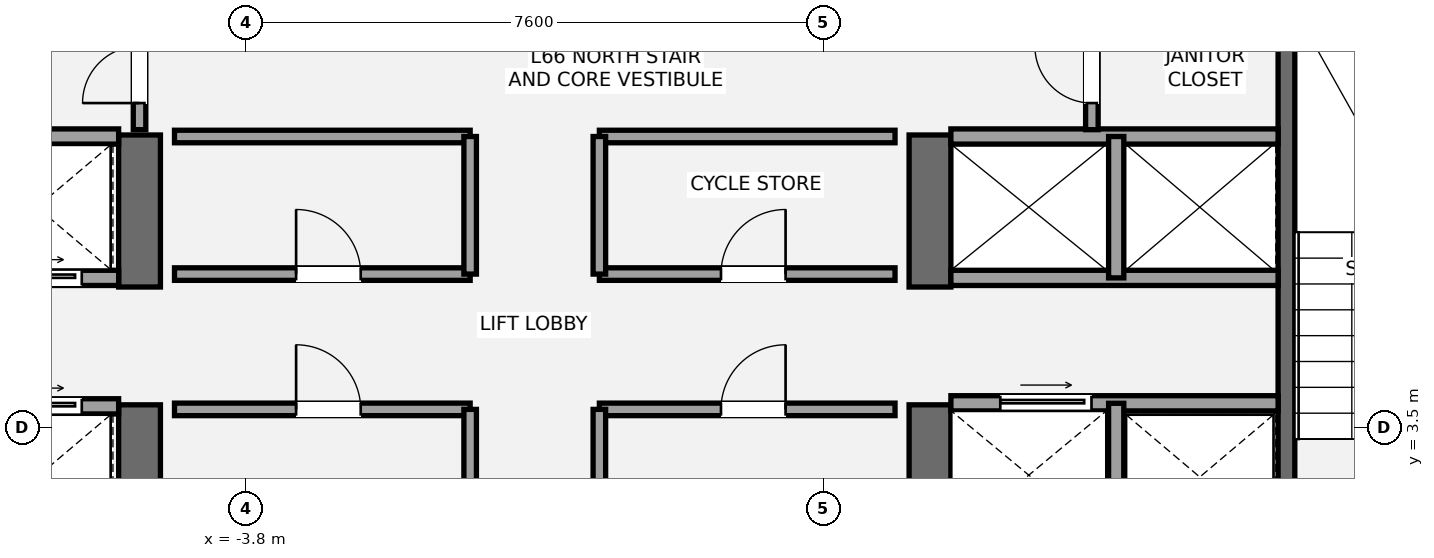
"""IFC4 building model, lengths in metres.
Left out: names, types, materials, properties, quantities, classifications, styles, units other than length and angle.
Written with IfcOpenShell. Run it as: python <this file> out.ifc"""

import sys

from ifc_helpers import new_model, si_unit, direction, frame, frame_2d, origin, place, context, subcontext, project, spatial, rectangle, extrude, element, fill, save


model = new_model("IFC4")
c1 = context("Model", 3, precision=1e-05, world=origin(), true_north=direction((0.0, 1.0)))
c2 = subcontext(c1, "Body", "Model", "MODEL_VIEW")
j1 = project(units=[si_unit("LENGTHUNIT", "METRE"), si_unit("PLANEANGLEUNIT", "RADIAN")], contexts=[c1])
p1 = place(None, origin())
s1 = spatial("IfcSite", under=j1, at=p1, CompositionType="ELEMENT")
p2 = place(p1, origin())
s2 = spatial("IfcBuilding", under=s1, at=p2, CompositionType="ELEMENT")
p3 = place(p2, frame((0.0, 0.0, 235.2)))
s3 = spatial("IfcBuildingStorey", under=s2, at=p3, CompositionType="ELEMENT", Elevation=235.2)
p4 = place(p3, frame((-5.2, 1.3, 0.0), z_axis=(0.0, 0.0, 1.0), x_axis=(0.0, 1.0, 0.0)))
e1 = element("IfcWall", 1, at=p4, inside=s3, PredefinedType="SHEAR", context=c2, shape_type="SweptSolid", body=[
    extrude(rectangle(XDim=2.5, YDim=0.55, at=frame_2d((1.25, 0.0))), origin(), (0.0, 0.0, 1.0), 3.15),
])
p5 = place(p3, frame((-5.2, 5.35, 0.0), z_axis=(0.0, 0.0, 1.0), x_axis=(0.0, 1.0, 0.0)))
e2 = element("IfcWall", 2, at=p5, inside=s3, PredefinedType="SHEAR", context=c2, shape_type="SweptSolid", body=[
    extrude(rectangle(XDim=2.0, YDim=0.55, at=frame_2d((1.0, 0.0))), origin(), (0.0, 0.0, 1.0), 3.15),
])
p6 = place(p3, frame((5.2, 1.3, 0.0), z_axis=(0.0, 0.0, 1.0), x_axis=(0.0, 1.0, 0.0)))
e3 = element("IfcWall", 3, at=p6, inside=s3, PredefinedType="SHEAR", context=c2, shape_type="SweptSolid", body=[
    extrude(rectangle(XDim=2.5, YDim=0.55, at=frame_2d((1.25, 0.0))), origin(), (0.0, 0.0, 1.0), 3.15),
])
p7 = place(p3, frame((5.2, 5.35, 0.0), z_axis=(0.0, 0.0, 1.0), x_axis=(0.0, 1.0, 0.0)))
e4 = element("IfcWall", 4, at=p7, inside=s3, PredefinedType="SHEAR", context=c2, shape_type="SweptSolid", body=[
    extrude(rectangle(XDim=2.0, YDim=0.55, at=frame_2d((1.0, 0.0))), origin(), (0.0, 0.0, 1.0), 3.15),
])
p8 = place(p3, frame((9.89, 1.85, 0.0), z_axis=(0.0, 0.0, 1.0), x_axis=(0.0, 1.0, 0.0)))
e5 = element("IfcWall", 5, at=p8, inside=s3, PredefinedType="SHEAR", context=c2, shape_type="SweptSolid", body=[
    extrude(rectangle(XDim=7.15, YDim=0.22, at=frame_2d((3.575, 0.0))), origin(), (0.0, 0.0, 1.0), 3.15),
])
p9 = place(p3, frame((-9.78, 3.78, 0.0), z_axis=(0.0, 0.0, 1.0), x_axis=(1.0, 0.0, 0.0)))
e6 = element("IfcWall", 6, at=p9, inside=s3, PredefinedType="SOLIDWALL", context=c2, shape_type="SweptSolid", body=[
    extrude(rectangle(XDim=4.305, YDim=0.2, at=frame_2d((2.152, 0.0))), origin(), (0.0, 0.0, 1.0), 2.97),
])
p10 = place(p9, frame((2.72, 0.0, 0.0)))
e7 = element("IfcOpeningElement", 7, at=p10, cuts=e6, PredefinedType="OPENING", context=c2, shape_type="SweptSolid", body=[
    extrude(rectangle(XDim=1.1, YDim=2.2, at=frame_2d((0.55, 1.1))), frame((0.0, 0.11, 0.0), z_axis=(0.0, -1.0, 0.0), x_axis=(1.0, 0.0, 0.0)), (0.0, 0.0, 1.0), 0.22),
])
p11 = place(p3, frame((-9.78, 5.47, 0.0), z_axis=(0.0, 0.0, 1.0), x_axis=(1.0, 0.0, 0.0)))
e8 = element("IfcWall", 8, at=p11, inside=s3, PredefinedType="SOLIDWALL", context=c2, shape_type="SweptSolid", body=[
    extrude(rectangle(XDim=4.305, YDim=0.2, at=frame_2d((2.152, 0.0))), origin(), (0.0, 0.0, 1.0), 2.97),
])
p12 = place(p11, frame((0.55, 0.0, 0.0)))
e9 = element("IfcOpeningElement", 9, at=p12, cuts=e8, PredefinedType="OPENING", context=c2, shape_type="SweptSolid", body=[
    extrude(rectangle(XDim=1.1, YDim=2.2, at=frame_2d((0.55, 1.1))), frame((0.0, 0.11, 0.0), z_axis=(0.0, -1.0, 0.0), x_axis=(1.0, 0.0, 0.0)), (0.0, 0.0, 1.0), 0.22),
])
p13 = place(p11, frame((2.72, 0.0, 0.0)))
e10 = element("IfcOpeningElement", 10, at=p13, cuts=e8, PredefinedType="OPENING", context=c2, shape_type="SweptSolid", body=[
    extrude(rectangle(XDim=1.1, YDim=2.2, at=frame_2d((0.55, 1.1))), frame((0.0, 0.11, 0.0), z_axis=(0.0, -1.0, 0.0), x_axis=(1.0, 0.0, 0.0)), (0.0, 0.0, 1.0), 0.22),
])
p14 = place(p3, frame((-9.78, 7.33, 0.0), z_axis=(0.0, 0.0, 1.0), x_axis=(1.0, 0.0, 0.0)))
e11 = element("IfcWall", 11, at=p14, inside=s3, PredefinedType="SOLIDWALL", context=c2, shape_type="SweptSolid", body=[
    extrude(rectangle(XDim=4.305, YDim=0.2, at=frame_2d((2.152, 0.0))), origin(), (0.0, 0.0, 1.0), 2.97),
])
p15 = place(p3, frame((5.475, 3.82, 0.0), z_axis=(0.0, 0.0, 1.0), x_axis=(1.0, 0.0, 0.0)))
e12 = element("IfcWall", 12, at=p15, inside=s3, PredefinedType="SOLIDWALL", context=c2, shape_type="SweptSolid", body=[
    extrude(rectangle(XDim=4.305, YDim=0.2, at=frame_2d((2.152, 0.0))), origin(), (0.0, 0.0, 1.0), 2.97),
])
p16 = place(p15, frame((0.65, 0.0, 0.0)))
e13 = element("IfcOpeningElement", 13, at=p16, cuts=e12, PredefinedType="OPENING", context=c2, shape_type="SweptSolid", body=[
    extrude(rectangle(XDim=1.2, YDim=2.2, at=frame_2d((0.6, 1.1))), frame((0.0, 0.11, 0.0), z_axis=(0.0, -1.0, 0.0), x_axis=(1.0, 0.0, 0.0)), (0.0, 0.0, 1.0), 0.22),
])
p17 = place(p3, frame((7.65, 1.85, 0.0), z_axis=(0.0, 0.0, 1.0), x_axis=(0.0, 1.0, 0.0)))
e14 = element("IfcWall", 14, at=p17, inside=s3, PredefinedType="SOLIDWALL", context=c2, shape_type="SweptSolid", body=[
    extrude(rectangle(XDim=1.97, YDim=0.2, at=frame_2d((0.985, 0.0))), origin(), (0.0, 0.0, 1.0), 2.97),
])
for number, where, z_axis, x_axis in (
    (15, (5.475, 5.47, 0.0), (0.0, 0.0, 1.0), (1.0, 0.0, 0.0)),
    (16, (5.475, 7.33, 0.0), (0.0, 0.0, 1.0), (1.0, 0.0, 0.0)),
):
    element("IfcWall", number, at=place(p3, frame(where, z_axis=z_axis, x_axis=x_axis)), inside=s3, PredefinedType="SOLIDWALL", context=c2, shape_type="SweptSolid", body=[
        extrude(rectangle(XDim=4.305, YDim=0.2, at=frame_2d((2.152, 0.0))), origin(), (0.0, 0.0, 1.0), 2.97),
    ])
p18 = place(p3, frame((7.65, 5.47, 0.0), z_axis=(0.0, 0.0, 1.0), x_axis=(0.0, 1.0, 0.0)))
e17 = element("IfcWall", 17, at=p18, inside=s3, PredefinedType="SOLIDWALL", context=c2, shape_type="SweptSolid", body=[
    extrude(rectangle(XDim=1.86, YDim=0.2, at=frame_2d((0.93, 0.0))), origin(), (0.0, 0.0, 1.0), 2.97),
])
p19 = place(p3, frame((-4.74, 3.74, 0.0), z_axis=(0.0, 0.0, 1.0), x_axis=(1.0, 0.0, 0.0)))
e18 = element("IfcWall", 18, at=p19, inside=s3, PredefinedType="PARTITIONING", context=c2, shape_type="SweptSolid", body=[
    extrude(rectangle(XDim=3.89, YDim=0.165, at=frame_2d((1.945, 0.0))), origin(), (0.0, 0.0, 1.0), 2.97),
])
p20 = place(p19, frame((1.6, 0.0, 0.0)))
e19 = element("IfcOpeningElement", 19, at=p20, cuts=e18, PredefinedType="OPENING", context=c2, shape_type="SweptSolid", body=[
    extrude(rectangle(XDim=0.85, YDim=2.1, at=frame_2d((0.425, 1.05))), frame((0.0, 0.093, 0.0), z_axis=(0.0, -1.0, 0.0), x_axis=(1.0, 0.0, 0.0)), (0.0, 0.0, 1.0), 0.185),
])
p21 = place(p3, frame((-0.85, 1.92, 0.0), z_axis=(0.0, 0.0, 1.0), x_axis=(0.0, 1.0, 0.0)))
e20 = element("IfcWall", 20, at=p21, inside=s3, PredefinedType="PARTITIONING", context=c2, shape_type="SweptSolid", body=[
    extrude(rectangle(XDim=1.82, YDim=0.165, at=frame_2d((0.91, 0.0))), origin(), (0.0, 0.0, 1.0), 2.97),
])
p22 = place(p3, frame((0.85, 3.74, 0.0), z_axis=(0.0, 0.0, 1.0), x_axis=(1.0, 0.0, 0.0)))
e21 = element("IfcWall", 21, at=p22, inside=s3, PredefinedType="PARTITIONING", context=c2, shape_type="SweptSolid", body=[
    extrude(rectangle(XDim=3.89, YDim=0.165, at=frame_2d((1.945, 0.0))), origin(), (0.0, 0.0, 1.0), 2.97),
])
p23 = place(p22, frame((1.6, 0.0, 0.0)))
e22 = element("IfcOpeningElement", 22, at=p23, cuts=e21, PredefinedType="OPENING", context=c2, shape_type="SweptSolid", body=[
    extrude(rectangle(XDim=0.85, YDim=2.1, at=frame_2d((0.425, 1.05))), frame((0.0, 0.093, 0.0), z_axis=(0.0, -1.0, 0.0), x_axis=(1.0, 0.0, 0.0)), (0.0, 0.0, 1.0), 0.185),
])
p24 = place(p3, frame((0.85, 1.92, 0.0), z_axis=(0.0, 0.0, 1.0), x_axis=(0.0, 1.0, 0.0)))
e23 = element("IfcWall", 23, at=p24, inside=s3, PredefinedType="PARTITIONING", context=c2, shape_type="SweptSolid", body=[
    extrude(rectangle(XDim=1.82, YDim=0.165, at=frame_2d((0.91, 0.0))), origin(), (0.0, 0.0, 1.0), 2.97),
])
p25 = place(p3, frame((-4.74, 5.52, 0.0), z_axis=(0.0, 0.0, 1.0), x_axis=(1.0, 0.0, 0.0)))
e24 = element("IfcWall", 24, at=p25, inside=s3, PredefinedType="PARTITIONING", context=c2, shape_type="SweptSolid", body=[
    extrude(rectangle(XDim=3.89, YDim=0.165, at=frame_2d((1.945, 0.0))), origin(), (0.0, 0.0, 1.0), 2.97),
])
p26 = place(p25, frame((1.6, 0.0, 0.0)))
e25 = element("IfcOpeningElement", 25, at=p26, cuts=e24, PredefinedType="OPENING", context=c2, shape_type="SweptSolid", body=[
    extrude(rectangle(XDim=0.85, YDim=2.1, at=frame_2d((0.425, 1.05))), frame((0.0, 0.093, 0.0), z_axis=(0.0, -1.0, 0.0), x_axis=(1.0, 0.0, 0.0)), (0.0, 0.0, 1.0), 0.185),
])
p27 = place(p3, frame((-4.74, 7.33, 0.0), z_axis=(0.0, 0.0, 1.0), x_axis=(1.0, 0.0, 0.0)))
e26 = element("IfcWall", 26, at=p27, inside=s3, PredefinedType="PARTITIONING", context=c2, shape_type="SweptSolid", body=[
    extrude(rectangle(XDim=3.89, YDim=0.165, at=frame_2d((1.945, 0.0))), origin(), (0.0, 0.0, 1.0), 2.97),
])
p28 = place(p3, frame((-0.85, 5.52, 0.0), z_axis=(0.0, 0.0, 1.0), x_axis=(0.0, 1.0, 0.0)))
e27 = element("IfcWall", 27, at=p28, inside=s3, PredefinedType="PARTITIONING", context=c2, shape_type="SweptSolid", body=[
    extrude(rectangle(XDim=1.81, YDim=0.165, at=frame_2d((0.905, 0.0))), origin(), (0.0, 0.0, 1.0), 2.97),
])
p29 = place(p3, frame((0.85, 5.52, 0.0), z_axis=(0.0, 0.0, 1.0), x_axis=(1.0, 0.0, 0.0)))
e28 = element("IfcWall", 28, at=p29, inside=s3, PredefinedType="PARTITIONING", context=c2, shape_type="SweptSolid", body=[
    extrude(rectangle(XDim=3.89, YDim=0.165, at=frame_2d((1.945, 0.0))), origin(), (0.0, 0.0, 1.0), 2.97),
])
p30 = place(p29, frame((1.6, 0.0, 0.0)))
e29 = element("IfcOpeningElement", 29, at=p30, cuts=e28, PredefinedType="OPENING", context=c2, shape_type="SweptSolid", body=[
    extrude(rectangle(XDim=0.85, YDim=2.1, at=frame_2d((0.425, 1.05))), frame((0.0, 0.093, 0.0), z_axis=(0.0, -1.0, 0.0), x_axis=(1.0, 0.0, 0.0)), (0.0, 0.0, 1.0), 0.185),
])
p31 = place(p3, frame((0.85, 7.33, 0.0), z_axis=(0.0, 0.0, 1.0), x_axis=(1.0, 0.0, 0.0)))
e30 = element("IfcWall", 30, at=p31, inside=s3, PredefinedType="PARTITIONING", context=c2, shape_type="SweptSolid", body=[
    extrude(rectangle(XDim=3.89, YDim=0.165, at=frame_2d((1.945, 0.0))), origin(), (0.0, 0.0, 1.0), 2.97),
])
p32 = place(p3, frame((0.85, 5.52, 0.0), z_axis=(0.0, 0.0, 1.0), x_axis=(0.0, 1.0, 0.0)))
e31 = element("IfcWall", 31, at=p32, inside=s3, PredefinedType="PARTITIONING", context=c2, shape_type="SweptSolid", body=[
    extrude(rectangle(XDim=1.81, YDim=0.165, at=frame_2d((0.905, 0.0))), origin(), (0.0, 0.0, 1.0), 2.97),
])
p33 = place(p3, frame((-5.2, 7.42, 0.0), z_axis=(0.0, 0.0, 1.0), x_axis=(0.0, 1.0, 0.0)))
e32 = element("IfcWall", 32, at=p33, inside=s3, PredefinedType="PARTITIONING", context=c2, shape_type="SweptSolid", body=[
    extrude(rectangle(XDim=1.58, YDim=0.165, at=frame_2d((0.79, 0.0))), origin(), (0.0, 0.0, 1.0), 2.97),
])
p34 = place(p33, frame((0.35, 0.0, 0.0)))
e33 = element("IfcOpeningElement", 33, at=p34, cuts=e32, PredefinedType="OPENING", context=c2, shape_type="SweptSolid", body=[
    extrude(rectangle(XDim=0.75, YDim=2.1, at=frame_2d((0.375, 1.05))), frame((0.0, 0.093, 0.0), z_axis=(0.0, -1.0, 0.0), x_axis=(1.0, 0.0, 0.0)), (0.0, 0.0, 1.0), 0.185),
])
p35 = place(p3, frame((7.33, 7.42, 0.0), z_axis=(0.0, 0.0, 1.0), x_axis=(0.0, 1.0, 0.0)))
e34 = element("IfcWall", 34, at=p35, inside=s3, PredefinedType="PARTITIONING", context=c2, shape_type="SweptSolid", body=[
    extrude(rectangle(XDim=1.58, YDim=0.165, at=frame_2d((0.79, 0.0))), origin(), (0.0, 0.0, 1.0), 2.97),
])
p36 = place(p35, frame((0.35, 0.0, 0.0)))
e35 = element("IfcOpeningElement", 35, at=p36, cuts=e34, PredefinedType="OPENING", context=c2, shape_type="SweptSolid", body=[
    extrude(rectangle(XDim=0.75, YDim=2.1, at=frame_2d((0.375, 1.05))), frame((0.0, 0.093, 0.0), z_axis=(0.0, -1.0, 0.0), x_axis=(1.0, 0.0, 0.0)), (0.0, 0.0, 1.0), 0.185),
])
p37 = place(p13, origin())
e36 = element("IfcDoor", 36, at=p37, inside=s3, OperationType="SLIDING_TO_LEFT", PredefinedType="DOOR", context=c2, shape_type="SweptSolid", body=[
    extrude(rectangle(XDim=1.1, YDim=2.2, at=frame_2d((0.55, 1.1))), frame((0.0, 0.025, 0.0), z_axis=(0.0, -1.0, 0.0), x_axis=(1.0, 0.0, 0.0)), (0.0, 0.0, 1.0), 0.05),
])
fill(e10, e36)
p38 = place(p10, origin())
e37 = element("IfcDoor", 37, at=p38, inside=s3, OperationType="SLIDING_TO_LEFT", PredefinedType="DOOR", context=c2, shape_type="SweptSolid", body=[
    extrude(rectangle(XDim=1.1, YDim=2.2, at=frame_2d((0.55, 1.1))), frame((0.0, 0.025, 0.0), z_axis=(0.0, -1.0, 0.0), x_axis=(1.0, 0.0, 0.0)), (0.0, 0.0, 1.0), 0.05),
])
fill(e7, e37)
p39 = place(p16, origin())
e38 = element("IfcDoor", 38, at=p39, inside=s3, OperationType="SLIDING_TO_RIGHT", PredefinedType="DOOR", context=c2, shape_type="SweptSolid", body=[
    extrude(rectangle(XDim=1.2, YDim=2.2, at=frame_2d((0.6, 1.1))), frame((0.0, 0.025, 0.0), z_axis=(0.0, -1.0, 0.0), x_axis=(1.0, 0.0, 0.0)), (0.0, 0.0, 1.0), 0.05),
])
fill(e13, e38)
p40 = place(p20, origin())
e39 = element("IfcDoor", 39, at=p40, inside=s3, OperationType="SINGLE_SWING_LEFT", PredefinedType="DOOR", context=c2, shape_type="SweptSolid", body=[
    extrude(rectangle(XDim=0.85, YDim=2.1, at=frame_2d((0.425, 1.05))), frame((0.0, 0.025, 0.0), z_axis=(0.0, -1.0, 0.0), x_axis=(1.0, 0.0, 0.0)), (0.0, 0.0, 1.0), 0.05),
])
fill(e19, e39)
p41 = place(p23, origin())
e40 = element("IfcDoor", 40, at=p41, inside=s3, OperationType="SINGLE_SWING_RIGHT", PredefinedType="DOOR", context=c2, shape_type="SweptSolid", body=[
    extrude(rectangle(XDim=0.85, YDim=2.1, at=frame_2d((0.425, 1.05))), frame((0.0, 0.025, 0.0), z_axis=(0.0, -1.0, 0.0), x_axis=(1.0, 0.0, 0.0)), (0.0, 0.0, 1.0), 0.05),
])
fill(e22, e40)
p42 = place(p26, origin())
e41 = element("IfcDoor", 41, at=p42, inside=s3, OperationType="SINGLE_SWING_LEFT", PredefinedType="DOOR", context=c2, shape_type="SweptSolid", body=[
    extrude(rectangle(XDim=0.85, YDim=2.1, at=frame_2d((0.425, 1.05))), frame((0.0, 0.025, 0.0), z_axis=(0.0, -1.0, 0.0), x_axis=(1.0, 0.0, 0.0)), (0.0, 0.0, 1.0), 0.05),
])
fill(e25, e41)
p43 = place(p30, origin())
e42 = element("IfcDoor", 42, at=p43, inside=s3, OperationType="SINGLE_SWING_RIGHT", PredefinedType="DOOR", context=c2, shape_type="SweptSolid", body=[
    extrude(rectangle(XDim=0.85, YDim=2.1, at=frame_2d((0.425, 1.05))), frame((0.0, 0.025, 0.0), z_axis=(0.0, -1.0, 0.0), x_axis=(1.0, 0.0, 0.0)), (0.0, 0.0, 1.0), 0.05),
])
fill(e29, e42)
p44 = place(p34, origin())
e43 = element("IfcDoor", 43, at=p44, inside=s3, OperationType="SINGLE_SWING_LEFT", PredefinedType="DOOR", context=c2, shape_type="SweptSolid", body=[
    extrude(rectangle(XDim=0.75, YDim=2.1, at=frame_2d((0.375, 1.05))), frame((0.0, 0.025, 0.0), z_axis=(0.0, -1.0, 0.0), x_axis=(1.0, 0.0, 0.0)), (0.0, 0.0, 1.0), 0.05),
])
fill(e33, e43)
p45 = place(p36, origin())
e44 = element("IfcDoor", 44, at=p45, inside=s3, OperationType="SINGLE_SWING_RIGHT", PredefinedType="DOOR", context=c2, shape_type="SweptSolid", body=[
    extrude(rectangle(XDim=0.75, YDim=2.1, at=frame_2d((0.375, 1.05))), frame((0.0, 0.025, 0.0), z_axis=(0.0, -1.0, 0.0), x_axis=(1.0, 0.0, 0.0)), (0.0, 0.0, 1.0), 0.05),
])
fill(e35, e44)
save(model, sys.argv[1])
